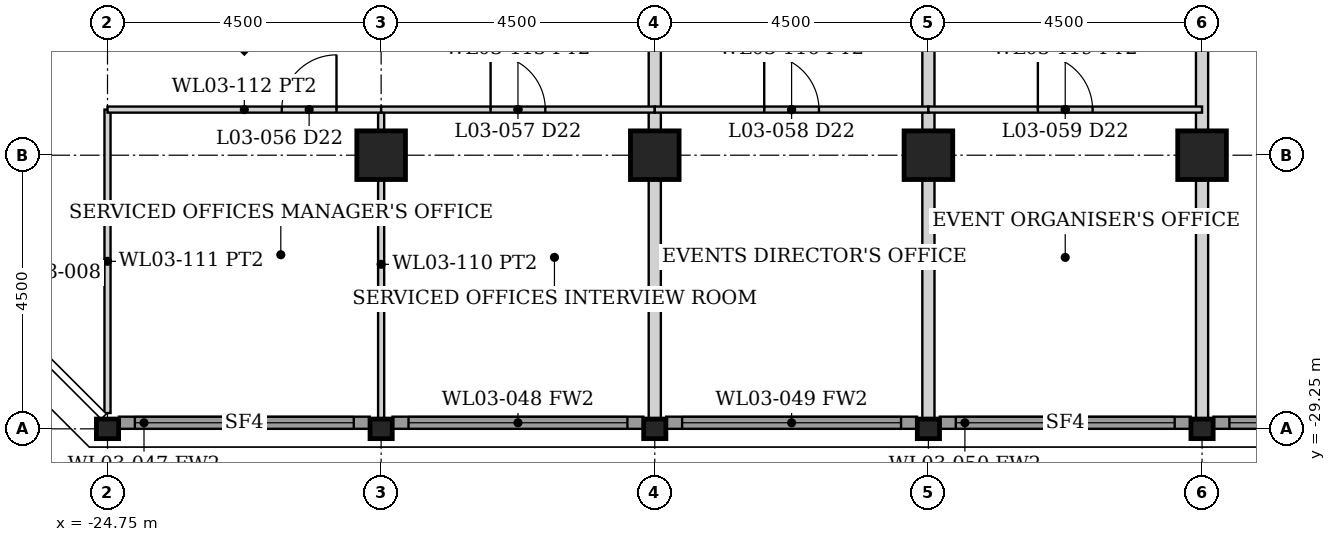
"""IFC4 building model, lengths in metres.
Left out: names, types, materials, properties, quantities, classifications, styles, units other than length and angle.
Written with IfcOpenShell. Run it as: python <this file> out.ifc"""

import sys

from ifc_helpers import new_model, si_unit, direction, frame, frame_2d, origin, origin_2d, place, context, subcontext, project, spatial, rectangle, hollow_rectangle, i_section, extrude, element, fill, save


model = new_model("IFC4")
c1 = context("Model", 3, precision=1e-05, world=origin(), true_north=direction((0.0, 1.0)))
c2 = subcontext(c1, "Body", "Model", "MODEL_VIEW")
j1 = project(units=[si_unit("LENGTHUNIT", "METRE"), si_unit("PLANEANGLEUNIT", "RADIAN")], contexts=[c1])
p1 = place(None, origin())
s1 = spatial("IfcSite", under=j1, at=p1, CompositionType="ELEMENT")
p2 = place(p1, origin())
s2 = spatial("IfcBuilding", under=s1, at=p2, CompositionType="ELEMENT")
p3 = place(p2, frame((0.0, 0.0, 16.0)))
s3 = spatial("IfcBuildingStorey", under=s2, at=p3, CompositionType="ELEMENT", Elevation=16.0)
for number, where, z_axis, x_axis in (
    (1, (-20.25, -24.75, 0.0), (0.0, 0.0, 1.0), (0.0, 1.0, 0.0)),
    (2, (-15.75, -24.75, 0.0), (0.0, 0.0, 1.0), (0.0, 1.0, 0.0)),
    (3, (-11.25, -24.75, 0.0), (0.0, 0.0, 1.0), (0.0, 1.0, 0.0)),
    (4, (-6.75, -24.75, 0.0), (0.0, 0.0, 1.0), (0.0, 1.0, 0.0)),
    (5, (-22.5, -22.5, 0.0), (0.0, 0.0, 1.0), (0.707, 0.707, 0.0)),
):
    element("IfcColumn", number, at=place(p3, frame(where, z_axis=z_axis, x_axis=x_axis)), inside=s3, PredefinedType="COLUMN", context=c2, shape_type="SweptSolid", body=[
        extrude(hollow_rectangle(XDim=0.8, YDim=0.8, WallThickness=0.08, at=origin_2d()), origin(), (0.0, 0.0, 1.0), 5.5),
    ])
for number, where, z_axis, x_axis in (
    (6, (-24.75, -29.25, 0.0), (0.0, 0.0, 1.0), (0.0, 1.0, 0.0)),
    (7, (-20.25, -29.25, 0.0), (0.0, 0.0, 1.0), (0.0, 1.0, 0.0)),
    (8, (-15.75, -29.25, 0.0), (0.0, 0.0, 1.0), (0.0, 1.0, 0.0)),
    (9, (-11.25, -29.25, 0.0), (0.0, 0.0, 1.0), (0.0, 1.0, 0.0)),
    (10, (-6.75, -29.25, 0.0), (0.0, 0.0, 1.0), (0.0, 1.0, 0.0)),
):
    element("IfcColumn", number, at=place(p3, frame(where, z_axis=z_axis, x_axis=x_axis)), inside=s3, PredefinedType="COLUMN", context=c2, shape_type="SweptSolid", body=[
        extrude(i_section(OverallWidth=0.322, OverallDepth=0.365, WebThickness=0.027, FlangeThickness=0.044, FilletRadius=0.015, at=origin_2d()), origin(), (0.0, 0.0, 1.0), 5.5),
    ])
p4 = place(p3, frame((-24.562, -29.15, 0.0), z_axis=(0.0, 0.0, 1.0), x_axis=(1.0, 0.0, 0.0)))
e11 = element("IfcWall", 11, at=p4, inside=s3, PredefinedType="SOLIDWALL", context=c2, shape_type="SweptSolid", body=[
    extrude(rectangle(XDim=4.125, YDim=0.2, at=frame_2d((2.062, 0.0))), origin(), (0.0, 0.0, 1.0), 4.633),
])
p5 = place(p4, frame((0.262, 0.0, 0.15)))
e12 = element("IfcOpeningElement", 12, at=p5, cuts=e11, PredefinedType="OPENING", context=c2, shape_type="SweptSolid", body=[
    extrude(rectangle(XDim=3.6, YDim=4.333, at=frame_2d((1.8, 2.167))), frame((0.0, 0.11, 0.0), z_axis=(0.0, -1.0, 0.0), x_axis=(1.0, 0.0, 0.0)), (0.0, 0.0, 1.0), 0.22),
])
p6 = place(p3, frame((-20.062, -29.15, 0.0), z_axis=(0.0, 0.0, 1.0), x_axis=(1.0, 0.0, 0.0)))
e13 = element("IfcWall", 13, at=p6, inside=s3, PredefinedType="SOLIDWALL", context=c2, shape_type="SweptSolid", body=[
    extrude(rectangle(XDim=4.125, YDim=0.2, at=frame_2d((2.062, 0.0))), origin(), (0.0, 0.0, 1.0), 4.633),
])
p7 = place(p6, frame((0.262, 0.0, 0.15)))
e14 = element("IfcOpeningElement", 14, at=p7, cuts=e13, PredefinedType="OPENING", context=c2, shape_type="SweptSolid", body=[
    extrude(rectangle(XDim=3.6, YDim=4.333, at=frame_2d((1.8, 2.167))), frame((0.0, 0.11, 0.0), z_axis=(0.0, -1.0, 0.0), x_axis=(1.0, 0.0, 0.0)), (0.0, 0.0, 1.0), 0.22),
])
p8 = place(p3, frame((-15.562, -29.15, 0.0), z_axis=(0.0, 0.0, 1.0), x_axis=(1.0, 0.0, 0.0)))
e15 = element("IfcWall", 15, at=p8, inside=s3, PredefinedType="SOLIDWALL", context=c2, shape_type="SweptSolid", body=[
    extrude(rectangle(XDim=4.125, YDim=0.2, at=frame_2d((2.062, 0.0))), origin(), (0.0, 0.0, 1.0), 4.633),
])
p9 = place(p8, frame((0.262, 0.0, 0.15)))
e16 = element("IfcOpeningElement", 16, at=p9, cuts=e15, PredefinedType="OPENING", context=c2, shape_type="SweptSolid", body=[
    extrude(rectangle(XDim=3.6, YDim=4.333, at=frame_2d((1.8, 2.167))), frame((0.0, 0.11, 0.0), z_axis=(0.0, -1.0, 0.0), x_axis=(1.0, 0.0, 0.0)), (0.0, 0.0, 1.0), 0.22),
])
p10 = place(p3, frame((-11.062, -29.15, 0.0), z_axis=(0.0, 0.0, 1.0), x_axis=(1.0, 0.0, 0.0)))
e17 = element("IfcWall", 17, at=p10, inside=s3, PredefinedType="SOLIDWALL", context=c2, shape_type="SweptSolid", body=[
    extrude(rectangle(XDim=4.125, YDim=0.2, at=frame_2d((2.062, 0.0))), origin(), (0.0, 0.0, 1.0), 4.633),
])
p11 = place(p10, frame((0.262, 0.0, 0.15)))
e18 = element("IfcOpeningElement", 18, at=p11, cuts=e17, PredefinedType="OPENING", context=c2, shape_type="SweptSolid", body=[
    extrude(rectangle(XDim=3.6, YDim=4.333, at=frame_2d((1.8, 2.167))), frame((0.0, 0.11, 0.0), z_axis=(0.0, -1.0, 0.0), x_axis=(1.0, 0.0, 0.0)), (0.0, 0.0, 1.0), 0.22),
])
p12 = place(p3, frame((-6.562, -29.15, 0.0), z_axis=(0.0, 0.0, 1.0), x_axis=(1.0, 0.0, 0.0)))
e19 = element("IfcWall", 19, at=p12, inside=s3, PredefinedType="SOLIDWALL", context=c2, shape_type="SweptSolid", body=[
    extrude(rectangle(XDim=4.125, YDim=0.2, at=frame_2d((2.062, 0.0))), origin(), (0.0, 0.0, 1.0), 4.633),
])
p13 = place(p12, frame((0.262, 0.0, 0.15)))
e20 = element("IfcOpeningElement", 20, at=p13, cuts=e19, PredefinedType="OPENING", context=c2, shape_type="SweptSolid", body=[
    extrude(rectangle(XDim=3.6, YDim=4.333, at=frame_2d((1.8, 2.167))), frame((0.0, 0.11, 0.0), z_axis=(0.0, -1.0, 0.0), x_axis=(1.0, 0.0, 0.0)), (0.0, 0.0, 1.0), 0.22),
])
for number, where, z_axis, x_axis in (
    (21, (-15.75, -29.089, 0.0), (0.0, 0.0, 1.0), (0.0, 1.0, 0.0)),
    (22, (-11.25, -29.089, 0.0), (0.0, 0.0, 1.0), (0.0, 1.0, 0.0)),
    (23, (-6.75, -29.089, 0.0), (0.0, 0.0, 1.0), (0.0, 1.0, 0.0)),
):
    element("IfcWall", number, at=place(p3, frame(where, z_axis=z_axis, x_axis=x_axis)), inside=s3, PredefinedType="PARTITIONING", context=c2, shape_type="SweptSolid", body=[
        extrude(rectangle(XDim=19.889, YDim=0.2, at=frame_2d((9.944, 0.0))), origin(), (0.0, 0.0, 1.0), 4.329),
    ])
p14 = place(p3, frame((-24.75, -28.99, 0.0), z_axis=(0.0, 0.0, 1.0), x_axis=(0.0, 1.0, 0.0)))
e24 = element("IfcWall", 24, at=p14, inside=s3, PredefinedType="PARTITIONING", context=c2, shape_type="SweptSolid", body=[
    extrude(rectangle(XDim=4.99, YDim=0.1, at=frame_2d((2.495, 0.0))), origin(), (0.0, 0.0, 1.0), 4.329),
])
p15 = place(p3, frame((-20.25, -29.089, 0.0), z_axis=(0.0, 0.0, 1.0), x_axis=(0.0, 1.0, 0.0)))
e25 = element("IfcWall", 25, at=p15, inside=s3, PredefinedType="PARTITIONING", context=c2, shape_type="SweptSolid", body=[
    extrude(rectangle(XDim=5.089, YDim=0.1, at=frame_2d((2.544, 0.0))), origin(), (0.0, 0.0, 1.0), 4.329),
])
p16 = place(p3, frame((-24.75, -24.0, 0.0), z_axis=(0.0, 0.0, 1.0), x_axis=(1.0, 0.0, 0.0)))
e26 = element("IfcWall", 26, at=p16, inside=s3, PredefinedType="PARTITIONING", context=c2, shape_type="SweptSolid", body=[
    extrude(rectangle(XDim=4.5, YDim=0.1, at=frame_2d((2.25, 0.0))), origin(), (0.0, 0.0, 1.0), 4.329),
])
p17 = place(p16, frame((2.866, 0.0, 0.0)))
e27 = element("IfcOpeningElement", 27, at=p17, cuts=e26, PredefinedType="OPENING", context=c2, shape_type="SweptSolid", body=[
    extrude(rectangle(XDim=0.9, YDim=2.1, at=frame_2d((0.45, 1.05))), frame((0.0, 0.06, 0.0), z_axis=(0.0, -1.0, 0.0), x_axis=(1.0, 0.0, 0.0)), (0.0, 0.0, 1.0), 0.12),
])
p18 = place(p3, frame((-20.25, -24.0, 0.0), z_axis=(0.0, 0.0, 1.0), x_axis=(1.0, 0.0, 0.0)))
e28 = element("IfcWall", 28, at=p18, inside=s3, PredefinedType="PARTITIONING", context=c2, shape_type="SweptSolid", body=[
    extrude(rectangle(XDim=4.5, YDim=0.1, at=frame_2d((2.25, 0.0))), origin(), (0.0, 0.0, 1.0), 4.329),
])
p19 = place(p18, frame((1.8, 0.0, 0.0)))
e29 = element("IfcOpeningElement", 29, at=p19, cuts=e28, PredefinedType="OPENING", context=c2, shape_type="SweptSolid", body=[
    extrude(rectangle(XDim=0.9, YDim=2.1, at=frame_2d((0.45, 1.05))), frame((0.0, 0.06, 0.0), z_axis=(0.0, -1.0, 0.0), x_axis=(1.0, 0.0, 0.0)), (0.0, 0.0, 1.0), 0.12),
])
p20 = place(p3, frame((-15.75, -24.0, 0.0), z_axis=(0.0, 0.0, 1.0), x_axis=(1.0, 0.0, 0.0)))
e30 = element("IfcWall", 30, at=p20, inside=s3, PredefinedType="PARTITIONING", context=c2, shape_type="SweptSolid", body=[
    extrude(rectangle(XDim=4.5, YDim=0.1, at=frame_2d((2.25, 0.0))), origin(), (0.0, 0.0, 1.0), 4.329),
])
p21 = place(p20, frame((1.8, 0.0, 0.0)))
e31 = element("IfcOpeningElement", 31, at=p21, cuts=e30, PredefinedType="OPENING", context=c2, shape_type="SweptSolid", body=[
    extrude(rectangle(XDim=0.9, YDim=2.1, at=frame_2d((0.45, 1.05))), frame((0.0, 0.06, 0.0), z_axis=(0.0, -1.0, 0.0), x_axis=(1.0, 0.0, 0.0)), (0.0, 0.0, 1.0), 0.12),
])
p22 = place(p3, frame((-11.25, -24.0, 0.0), z_axis=(0.0, 0.0, 1.0), x_axis=(1.0, 0.0, 0.0)))
e32 = element("IfcWall", 32, at=p22, inside=s3, PredefinedType="PARTITIONING", context=c2, shape_type="SweptSolid", body=[
    extrude(rectangle(XDim=4.5, YDim=0.1, at=frame_2d((2.25, 0.0))), origin(), (0.0, 0.0, 1.0), 4.329),
])
p23 = place(p22, frame((1.8, 0.0, 0.0)))
e33 = element("IfcOpeningElement", 33, at=p23, cuts=e32, PredefinedType="OPENING", context=c2, shape_type="SweptSolid", body=[
    extrude(rectangle(XDim=0.9, YDim=2.1, at=frame_2d((0.45, 1.05))), frame((0.0, 0.06, 0.0), z_axis=(0.0, -1.0, 0.0), x_axis=(1.0, 0.0, 0.0)), (0.0, 0.0, 1.0), 0.12),
])
p24 = place(p5, origin())
e34 = element("IfcWindow", 34, at=p24, inside=s3, PartitioningType="SINGLE_PANEL", PredefinedType="WINDOW", context=c2, shape_type="SweptSolid", body=[
    extrude(rectangle(XDim=3.6, YDim=4.333, at=frame_2d((1.8, 2.167))), frame((0.0, 0.03, 0.0), z_axis=(0.0, -1.0, 0.0), x_axis=(1.0, 0.0, 0.0)), (0.0, 0.0, 1.0), 0.06),
])
fill(e12, e34)
p25 = place(p7, origin())
e35 = element("IfcWindow", 35, at=p25, inside=s3, PartitioningType="SINGLE_PANEL", PredefinedType="WINDOW", context=c2, shape_type="SweptSolid", body=[
    extrude(rectangle(XDim=3.6, YDim=4.333, at=frame_2d((1.8, 2.167))), frame((0.0, 0.03, 0.0), z_axis=(0.0, -1.0, 0.0), x_axis=(1.0, 0.0, 0.0)), (0.0, 0.0, 1.0), 0.06),
])
fill(e14, e35)
p26 = place(p9, origin())
e36 = element("IfcWindow", 36, at=p26, inside=s3, PartitioningType="SINGLE_PANEL", PredefinedType="WINDOW", context=c2, shape_type="SweptSolid", body=[
    extrude(rectangle(XDim=3.6, YDim=4.333, at=frame_2d((1.8, 2.167))), frame((0.0, 0.03, 0.0), z_axis=(0.0, -1.0, 0.0), x_axis=(1.0, 0.0, 0.0)), (0.0, 0.0, 1.0), 0.06),
])
fill(e16, e36)
p27 = place(p11, origin())
e37 = element("IfcWindow", 37, at=p27, inside=s3, PartitioningType="SINGLE_PANEL", PredefinedType="WINDOW", context=c2, shape_type="SweptSolid", body=[
    extrude(rectangle(XDim=3.6, YDim=4.333, at=frame_2d((1.8, 2.167))), frame((0.0, 0.03, 0.0), z_axis=(0.0, -1.0, 0.0), x_axis=(1.0, 0.0, 0.0)), (0.0, 0.0, 1.0), 0.06),
])
fill(e18, e37)
p28 = place(p13, origin())
e38 = element("IfcWindow", 38, at=p28, inside=s3, PartitioningType="SINGLE_PANEL", PredefinedType="WINDOW", context=c2, shape_type="SweptSolid", body=[
    extrude(rectangle(XDim=3.6, YDim=4.333, at=frame_2d((1.8, 2.167))), frame((0.0, 0.03, 0.0), z_axis=(0.0, -1.0, 0.0), x_axis=(1.0, 0.0, 0.0)), (0.0, 0.0, 1.0), 0.06),
])
fill(e20, e38)
p29 = place(p17, origin())
e39 = element("IfcDoor", 39, at=p29, inside=s3, OperationType="SINGLE_SWING_RIGHT", PredefinedType="DOOR", context=c2, shape_type="SweptSolid", body=[
    extrude(rectangle(XDim=0.9, YDim=2.1, at=frame_2d((0.45, 1.05))), frame((0.0, 0.025, 0.0), z_axis=(0.0, -1.0, 0.0), x_axis=(1.0, 0.0, 0.0)), (0.0, 0.0, 1.0), 0.05),
])
fill(e27, e39)
p30 = place(p19, origin())
e40 = element("IfcDoor", 40, at=p30, inside=s3, OperationType="SINGLE_SWING_LEFT", PredefinedType="DOOR", context=c2, shape_type="SweptSolid", body=[
    extrude(rectangle(XDim=0.9, YDim=2.1, at=frame_2d((0.45, 1.05))), frame((0.0, 0.025, 0.0), z_axis=(0.0, -1.0, 0.0), x_axis=(1.0, 0.0, 0.0)), (0.0, 0.0, 1.0), 0.05),
])
fill(e29, e40)
p31 = place(p21, origin())
e41 = element("IfcDoor", 41, at=p31, inside=s3, OperationType="SINGLE_SWING_LEFT", PredefinedType="DOOR", context=c2, shape_type="SweptSolid", body=[
    extrude(rectangle(XDim=0.9, YDim=2.1, at=frame_2d((0.45, 1.05))), frame((0.0, 0.025, 0.0), z_axis=(0.0, -1.0, 0.0), x_axis=(1.0, 0.0, 0.0)), (0.0, 0.0, 1.0), 0.05),
])
fill(e31, e41)
p32 = place(p23, origin())
e42 = element("IfcDoor", 42, at=p32, inside=s3, OperationType="SINGLE_SWING_LEFT", PredefinedType="DOOR", context=c2, shape_type="SweptSolid", body=[
    extrude(rectangle(XDim=0.9, YDim=2.1, at=frame_2d((0.45, 1.05))), frame((0.0, 0.025, 0.0), z_axis=(0.0, -1.0, 0.0), x_axis=(1.0, 0.0, 0.0)), (0.0, 0.0, 1.0), 0.05),
])
fill(e33, e42)
save(model, sys.argv[1])
